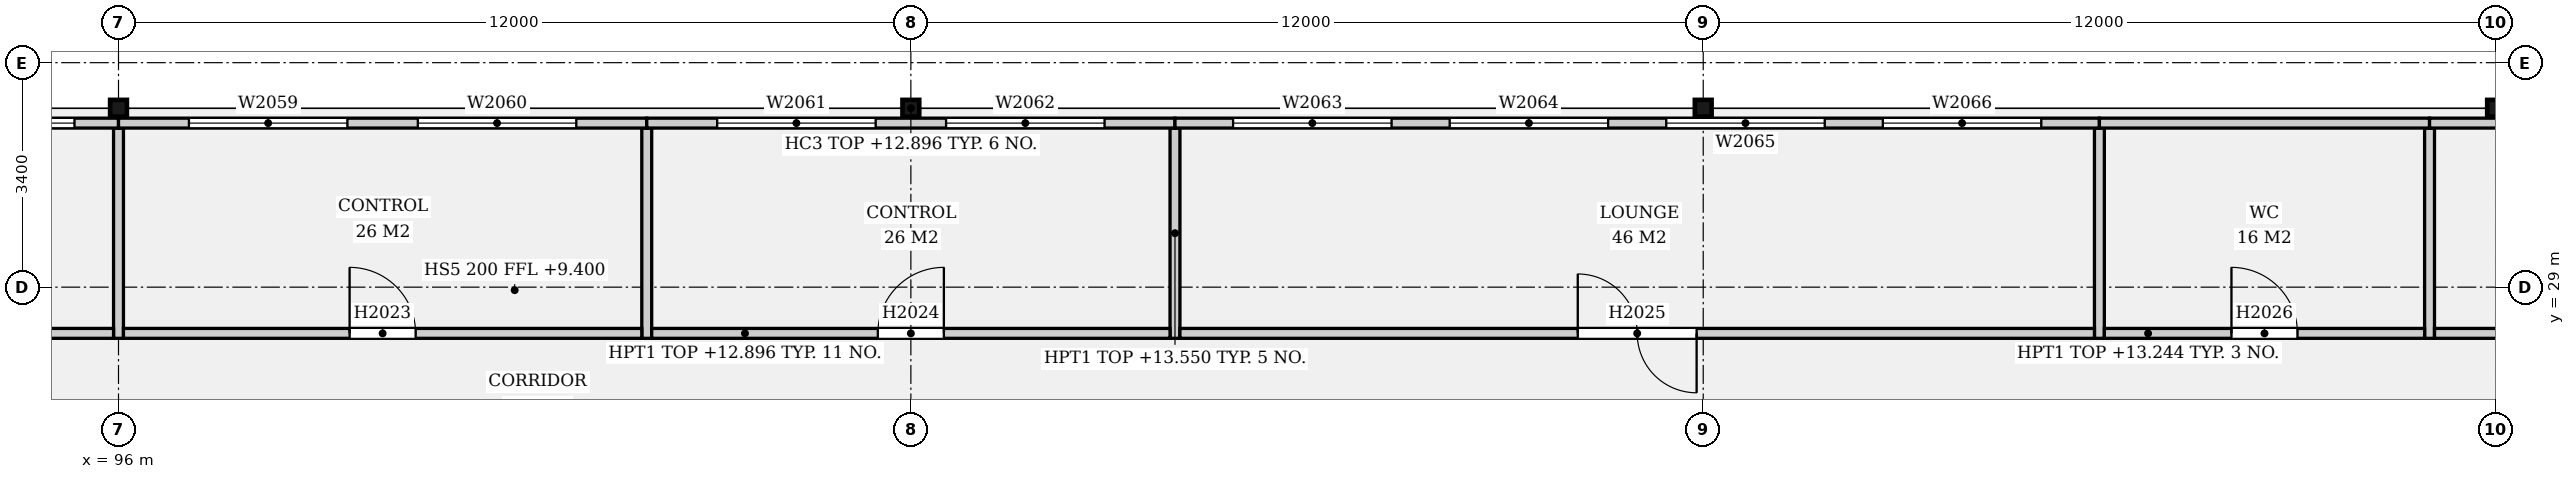
"""IFC4 building model, lengths in metres.
Left out: names, types, materials, properties, quantities, classifications, styles, units other than length and angle.
Written with IfcOpenShell. Run it as: python <this file> out.ifc"""

import sys

from ifc_helpers import new_model, si_unit, direction, frame, frame_2d, origin, origin_2d, place, context, subcontext, project, spatial, rectangle, hollow_rectangle, extrude, element, fill, save


model = new_model("IFC4")
c1 = context("Model", 3, precision=1e-05, world=origin(), true_north=direction((0.0, 1.0)))
c2 = subcontext(c1, "Body", "Model", "MODEL_VIEW")
j1 = project(units=[si_unit("LENGTHUNIT", "METRE"), si_unit("PLANEANGLEUNIT", "RADIAN")], contexts=[c1])
p1 = place(None, origin())
s1 = spatial("IfcSite", under=j1, at=p1, CompositionType="ELEMENT")
p2 = place(p1, origin())
s2 = spatial("IfcBuilding", under=s1, at=p2, CompositionType="ELEMENT")
p3 = place(p2, frame((0.0, 0.0, 9.4)))
s3 = spatial("IfcBuildingStorey", under=s2, at=p3, CompositionType="ELEMENT", Elevation=9.4)
for number, where, z_axis, x_axis in (
    (1, (96.0, 31.71, 0.0), (0.0, 0.0, 1.0), (1.0, 0.0, 0.0)),
    (2, (108.0, 31.71, 0.0), (0.0, 0.0, 1.0), (1.0, 0.0, 0.0)),
    (3, (120.0, 31.71, 0.0), (0.0, 0.0, 1.0), (1.0, 0.0, 0.0)),
    (4, (132.0, 31.71, 0.0), (0.0, 0.0, 1.0), (1.0, 0.0, 0.0)),
):
    element("IfcColumn", number, at=place(p3, frame(where, z_axis=z_axis, x_axis=x_axis)), inside=s3, PredefinedType="COLUMN", context=c2, shape_type="SweptSolid", body=[
        extrude(hollow_rectangle(XDim=0.254, YDim=0.254, WallThickness=0.016, InnerFilletRadius=0.008, OuterFilletRadius=0.024, at=origin_2d()), origin(), (0.0, 0.0, 1.0), 3.496),
    ])
p4 = place(p3, frame((80.075, 28.3, 0.0), z_axis=(0.0, 0.0, 1.0), x_axis=(1.0, 0.0, 0.0)))
e5 = element("IfcWall", 5, at=p4, inside=s3, PredefinedType="PARTITIONING", context=c2, shape_type="SweptSolid", body=[
    extrude(rectangle(XDim=15.85, YDim=0.15, at=frame_2d((7.925, 0.0))), origin(), (0.0, 0.0, 1.0), 3.496),
])
p5 = place(p4, frame((7.025, 0.0, 0.0)))
e6 = element("IfcOpeningElement", 6, at=p5, cuts=e5, PredefinedType="OPENING", context=c2, shape_type="SweptSolid", body=[
    extrude(rectangle(XDim=1.8, YDim=2.1, at=frame_2d((0.9, 1.05))), frame((0.0, 0.085, 0.0), z_axis=(0.0, -1.0, 0.0), x_axis=(1.0, 0.0, 0.0)), (0.0, 0.0, 1.0), 0.17),
])
p6 = place(p3, frame((96.0, 31.41, 0.0), z_axis=(0.0, 0.0, 1.0), x_axis=(0.0, -1.0, 0.0)))
e7 = element("IfcWall", 7, at=p6, inside=s3, PredefinedType="PARTITIONING", context=c2, shape_type="SweptSolid", body=[
    extrude(rectangle(XDim=3.185, YDim=0.15, at=frame_2d((1.592, 0.0))), origin(), (0.0, 0.0, 1.0), 3.496),
])
p7 = place(p3, frame((80.0, 31.485, 0.0), z_axis=(0.0, 0.0, 1.0), x_axis=(1.0, 0.0, 0.0)))
e8 = element("IfcWall", 8, at=p7, inside=s3, PredefinedType="PARTITIONING", context=c2, shape_type="SweptSolid", body=[
    extrude(rectangle(XDim=16.0, YDim=0.15, at=frame_2d((8.0, 0.0))), origin(), (0.0, 0.0, 1.0), 3.496),
])
p8 = place(p7, frame((0.667, 0.0, 1.0)))
e9 = element("IfcOpeningElement", 9, at=p8, cuts=e8, PredefinedType="OPENING", context=c2, shape_type="SweptSolid", body=[
    extrude(rectangle(XDim=2.4, YDim=1.5, at=frame_2d((1.2, 0.75))), frame((0.0, 0.085, 0.0), z_axis=(0.0, -1.0, 0.0), x_axis=(1.0, 0.0, 0.0)), (0.0, 0.0, 1.0), 0.17),
])
p9 = place(p7, frame((3.733, 0.0, 1.0)))
e10 = element("IfcOpeningElement", 10, at=p9, cuts=e8, PredefinedType="OPENING", context=c2, shape_type="SweptSolid", body=[
    extrude(rectangle(XDim=2.4, YDim=1.5, at=frame_2d((1.2, 0.75))), frame((0.0, 0.085, 0.0), z_axis=(0.0, -1.0, 0.0), x_axis=(1.0, 0.0, 0.0)), (0.0, 0.0, 1.0), 0.17),
])
p10 = place(p7, frame((6.8, 0.0, 1.0)))
e11 = element("IfcOpeningElement", 11, at=p10, cuts=e8, PredefinedType="OPENING", context=c2, shape_type="SweptSolid", body=[
    extrude(rectangle(XDim=2.4, YDim=1.5, at=frame_2d((1.2, 0.75))), frame((0.0, 0.085, 0.0), z_axis=(0.0, -1.0, 0.0), x_axis=(1.0, 0.0, 0.0)), (0.0, 0.0, 1.0), 0.17),
])
p11 = place(p7, frame((9.867, 0.0, 1.0)))
e12 = element("IfcOpeningElement", 12, at=p11, cuts=e8, PredefinedType="OPENING", context=c2, shape_type="SweptSolid", body=[
    extrude(rectangle(XDim=2.4, YDim=1.5, at=frame_2d((1.2, 0.75))), frame((0.0, 0.085, 0.0), z_axis=(0.0, -1.0, 0.0), x_axis=(1.0, 0.0, 0.0)), (0.0, 0.0, 1.0), 0.17),
])
p12 = place(p7, frame((12.933, 0.0, 1.0)))
e13 = element("IfcOpeningElement", 13, at=p12, cuts=e8, PredefinedType="OPENING", context=c2, shape_type="SweptSolid", body=[
    extrude(rectangle(XDim=2.4, YDim=1.5, at=frame_2d((1.2, 0.75))), frame((0.0, 0.085, 0.0), z_axis=(0.0, -1.0, 0.0), x_axis=(1.0, 0.0, 0.0)), (0.0, 0.0, 1.0), 0.17),
])
p13 = place(p3, frame((96.075, 28.3, 0.0), z_axis=(0.0, 0.0, 1.0), x_axis=(1.0, 0.0, 0.0)))
e14 = element("IfcWall", 14, at=p13, inside=s3, PredefinedType="PARTITIONING", context=c2, shape_type="SweptSolid", body=[
    extrude(rectangle(XDim=7.85, YDim=0.15, at=frame_2d((3.925, 0.0))), origin(), (0.0, 0.0, 1.0), 3.496),
])
p14 = place(p13, frame((3.425, 0.0, 0.0)))
e15 = element("IfcOpeningElement", 15, at=p14, cuts=e14, PredefinedType="OPENING", context=c2, shape_type="SweptSolid", body=[
    extrude(rectangle(XDim=1.0, YDim=2.1, at=frame_2d((0.5, 1.05))), frame((0.0, 0.085, 0.0), z_axis=(0.0, -1.0, 0.0), x_axis=(1.0, 0.0, 0.0)), (0.0, 0.0, 1.0), 0.17),
])
p15 = place(p3, frame((104.0, 31.41, 0.0), z_axis=(0.0, 0.0, 1.0), x_axis=(0.0, -1.0, 0.0)))
e16 = element("IfcWall", 16, at=p15, inside=s3, PredefinedType="PARTITIONING", context=c2, shape_type="SweptSolid", body=[
    extrude(rectangle(XDim=3.185, YDim=0.15, at=frame_2d((1.592, 0.0))), origin(), (0.0, 0.0, 1.0), 4.15),
])
p16 = place(p3, frame((96.0, 31.485, 0.0), z_axis=(0.0, 0.0, 1.0), x_axis=(1.0, 0.0, 0.0)))
e17 = element("IfcWall", 17, at=p16, inside=s3, PredefinedType="PARTITIONING", context=c2, shape_type="SweptSolid", body=[
    extrude(rectangle(XDim=8.0, YDim=0.15, at=frame_2d((4.0, 0.0))), origin(), (0.0, 0.0, 1.0), 3.496),
])
p17 = place(p16, frame((1.067, 0.0, 1.0)))
e18 = element("IfcOpeningElement", 18, at=p17, cuts=e17, PredefinedType="OPENING", context=c2, shape_type="SweptSolid", body=[
    extrude(rectangle(XDim=2.4, YDim=1.5, at=frame_2d((1.2, 0.75))), frame((0.0, 0.085, 0.0), z_axis=(0.0, -1.0, 0.0), x_axis=(1.0, 0.0, 0.0)), (0.0, 0.0, 1.0), 0.17),
])
p18 = place(p16, frame((4.533, 0.0, 1.0)))
e19 = element("IfcOpeningElement", 19, at=p18, cuts=e17, PredefinedType="OPENING", context=c2, shape_type="SweptSolid", body=[
    extrude(rectangle(XDim=2.4, YDim=1.5, at=frame_2d((1.2, 0.75))), frame((0.0, 0.085, 0.0), z_axis=(0.0, -1.0, 0.0), x_axis=(1.0, 0.0, 0.0)), (0.0, 0.0, 1.0), 0.17),
])
p19 = place(p3, frame((104.075, 28.3, 0.0), z_axis=(0.0, 0.0, 1.0), x_axis=(1.0, 0.0, 0.0)))
e20 = element("IfcWall", 20, at=p19, inside=s3, PredefinedType="PARTITIONING", context=c2, shape_type="SweptSolid", body=[
    extrude(rectangle(XDim=7.85, YDim=0.15, at=frame_2d((3.925, 0.0))), origin(), (0.0, 0.0, 1.0), 3.496),
])
p20 = place(p19, frame((3.425, 0.0, 0.0)))
e21 = element("IfcOpeningElement", 21, at=p20, cuts=e20, PredefinedType="OPENING", context=c2, shape_type="SweptSolid", body=[
    extrude(rectangle(XDim=1.0, YDim=2.1, at=frame_2d((0.5, 1.05))), frame((0.0, 0.085, 0.0), z_axis=(0.0, -1.0, 0.0), x_axis=(1.0, 0.0, 0.0)), (0.0, 0.0, 1.0), 0.17),
])
p21 = place(p3, frame((112.0, 31.41, 0.0), z_axis=(0.0, 0.0, 1.0), x_axis=(0.0, -1.0, 0.0)))
e22 = element("IfcWall", 22, at=p21, inside=s3, PredefinedType="PARTITIONING", context=c2, shape_type="SweptSolid", body=[
    extrude(rectangle(XDim=3.185, YDim=0.15, at=frame_2d((1.592, 0.0))), origin(), (0.0, 0.0, 1.0), 4.15),
])
p22 = place(p3, frame((104.0, 31.485, 0.0), z_axis=(0.0, 0.0, 1.0), x_axis=(1.0, 0.0, 0.0)))
e23 = element("IfcWall", 23, at=p22, inside=s3, PredefinedType="PARTITIONING", context=c2, shape_type="SweptSolid", body=[
    extrude(rectangle(XDim=8.0, YDim=0.15, at=frame_2d((4.0, 0.0))), origin(), (0.0, 0.0, 1.0), 3.496),
])
p23 = place(p22, frame((1.067, 0.0, 1.0)))
e24 = element("IfcOpeningElement", 24, at=p23, cuts=e23, PredefinedType="OPENING", context=c2, shape_type="SweptSolid", body=[
    extrude(rectangle(XDim=2.4, YDim=1.5, at=frame_2d((1.2, 0.75))), frame((0.0, 0.085, 0.0), z_axis=(0.0, -1.0, 0.0), x_axis=(1.0, 0.0, 0.0)), (0.0, 0.0, 1.0), 0.17),
])
p24 = place(p22, frame((4.533, 0.0, 1.0)))
e25 = element("IfcOpeningElement", 25, at=p24, cuts=e23, PredefinedType="OPENING", context=c2, shape_type="SweptSolid", body=[
    extrude(rectangle(XDim=2.4, YDim=1.5, at=frame_2d((1.2, 0.75))), frame((0.0, 0.085, 0.0), z_axis=(0.0, -1.0, 0.0), x_axis=(1.0, 0.0, 0.0)), (0.0, 0.0, 1.0), 0.17),
])
p25 = place(p3, frame((112.075, 28.3, 0.0), z_axis=(0.0, 0.0, 1.0), x_axis=(1.0, 0.0, 0.0)))
e26 = element("IfcWall", 26, at=p25, inside=s3, PredefinedType="PARTITIONING", context=c2, shape_type="SweptSolid", body=[
    extrude(rectangle(XDim=13.85, YDim=0.15, at=frame_2d((6.925, 0.0))), origin(), (0.0, 0.0, 1.0), 3.496),
])
p26 = place(p25, frame((6.025, 0.0, 0.0)))
e27 = element("IfcOpeningElement", 27, at=p26, cuts=e26, PredefinedType="OPENING", context=c2, shape_type="SweptSolid", body=[
    extrude(rectangle(XDim=1.8, YDim=2.1, at=frame_2d((0.9, 1.05))), frame((0.0, 0.085, 0.0), z_axis=(0.0, -1.0, 0.0), x_axis=(1.0, 0.0, 0.0)), (0.0, 0.0, 1.0), 0.17),
])
p27 = place(p3, frame((126.0, 31.41, 0.0), z_axis=(0.0, 0.0, 1.0), x_axis=(0.0, -1.0, 0.0)))
e28 = element("IfcWall", 28, at=p27, inside=s3, PredefinedType="PARTITIONING", context=c2, shape_type="SweptSolid", body=[
    extrude(rectangle(XDim=3.185, YDim=0.15, at=frame_2d((1.592, 0.0))), origin(), (0.0, 0.0, 1.0), 3.844),
])
p28 = place(p3, frame((112.0, 31.485, 0.0), z_axis=(0.0, 0.0, 1.0), x_axis=(1.0, 0.0, 0.0)))
e29 = element("IfcWall", 29, at=p28, inside=s3, PredefinedType="PARTITIONING", context=c2, shape_type="SweptSolid", body=[
    extrude(rectangle(XDim=14.0, YDim=0.15, at=frame_2d((7.0, 0.0))), origin(), (0.0, 0.0, 1.0), 3.496),
])
p29 = place(p28, frame((0.88, 0.0, 1.0)))
e30 = element("IfcOpeningElement", 30, at=p29, cuts=e29, PredefinedType="OPENING", context=c2, shape_type="SweptSolid", body=[
    extrude(rectangle(XDim=2.4, YDim=1.5, at=frame_2d((1.2, 0.75))), frame((0.0, 0.085, 0.0), z_axis=(0.0, -1.0, 0.0), x_axis=(1.0, 0.0, 0.0)), (0.0, 0.0, 1.0), 0.17),
])
p30 = place(p28, frame((4.16, 0.0, 1.0)))
e31 = element("IfcOpeningElement", 31, at=p30, cuts=e29, PredefinedType="OPENING", context=c2, shape_type="SweptSolid", body=[
    extrude(rectangle(XDim=2.4, YDim=1.5, at=frame_2d((1.2, 0.75))), frame((0.0, 0.085, 0.0), z_axis=(0.0, -1.0, 0.0), x_axis=(1.0, 0.0, 0.0)), (0.0, 0.0, 1.0), 0.17),
])
p31 = place(p28, frame((7.44, 0.0, 1.0)))
e32 = element("IfcOpeningElement", 32, at=p31, cuts=e29, PredefinedType="OPENING", context=c2, shape_type="SweptSolid", body=[
    extrude(rectangle(XDim=2.4, YDim=1.5, at=frame_2d((1.2, 0.75))), frame((0.0, 0.085, 0.0), z_axis=(0.0, -1.0, 0.0), x_axis=(1.0, 0.0, 0.0)), (0.0, 0.0, 1.0), 0.17),
])
p32 = place(p28, frame((10.72, 0.0, 1.0)))
e33 = element("IfcOpeningElement", 33, at=p32, cuts=e29, PredefinedType="OPENING", context=c2, shape_type="SweptSolid", body=[
    extrude(rectangle(XDim=2.4, YDim=1.5, at=frame_2d((1.2, 0.75))), frame((0.0, 0.085, 0.0), z_axis=(0.0, -1.0, 0.0), x_axis=(1.0, 0.0, 0.0)), (0.0, 0.0, 1.0), 0.17),
])
p33 = place(p3, frame((126.075, 28.3, 0.0), z_axis=(0.0, 0.0, 1.0), x_axis=(1.0, 0.0, 0.0)))
e34 = element("IfcWall", 34, at=p33, inside=s3, PredefinedType="PARTITIONING", context=c2, shape_type="SweptSolid", body=[
    extrude(rectangle(XDim=4.85, YDim=0.15, at=frame_2d((2.425, 0.0))), origin(), (0.0, 0.0, 1.0), 3.844),
])
p34 = place(p33, frame((1.925, 0.0, 0.0)))
e35 = element("IfcOpeningElement", 35, at=p34, cuts=e34, PredefinedType="OPENING", context=c2, shape_type="SweptSolid", body=[
    extrude(rectangle(XDim=1.0, YDim=2.1, at=frame_2d((0.5, 1.05))), frame((0.0, 0.085, 0.0), z_axis=(0.0, -1.0, 0.0), x_axis=(1.0, 0.0, 0.0)), (0.0, 0.0, 1.0), 0.17),
])
p35 = place(p3, frame((131.0, 31.41, 0.0), z_axis=(0.0, 0.0, 1.0), x_axis=(0.0, -1.0, 0.0)))
e36 = element("IfcWall", 36, at=p35, inside=s3, PredefinedType="PARTITIONING", context=c2, shape_type="SweptSolid", body=[
    extrude(rectangle(XDim=3.185, YDim=0.15, at=frame_2d((1.592, 0.0))), origin(), (0.0, 0.0, 1.0), 4.15),
])
p36 = place(p3, frame((126.0, 31.485, 0.0), z_axis=(0.0, 0.0, 1.0), x_axis=(1.0, 0.0, 0.0)))
e37 = element("IfcWall", 37, at=p36, inside=s3, PredefinedType="PARTITIONING", context=c2, shape_type="SweptSolid", body=[
    extrude(rectangle(XDim=5.0, YDim=0.15, at=frame_2d((2.5, 0.0))), origin(), (0.0, 0.0, 1.0), 3.844),
])
p37 = place(p3, frame((131.075, 28.3, 0.0), z_axis=(0.0, 0.0, 1.0), x_axis=(1.0, 0.0, 0.0)))
e38 = element("IfcWall", 38, at=p37, inside=s3, PredefinedType="PARTITIONING", context=c2, shape_type="SweptSolid", body=[
    extrude(rectangle(XDim=4.85, YDim=0.15, at=frame_2d((2.425, 0.0))), origin(), (0.0, 0.0, 1.0), 3.496),
])
p38 = place(p37, frame((1.925, 0.0, 0.0)))
e39 = element("IfcOpeningElement", 39, at=p38, cuts=e38, PredefinedType="OPENING", context=c2, shape_type="SweptSolid", body=[
    extrude(rectangle(XDim=1.0, YDim=2.1, at=frame_2d((0.5, 1.05))), frame((0.0, 0.085, 0.0), z_axis=(0.0, -1.0, 0.0), x_axis=(1.0, 0.0, 0.0)), (0.0, 0.0, 1.0), 0.17),
])
p39 = place(p3, frame((131.0, 31.485, 0.0), z_axis=(0.0, 0.0, 1.0), x_axis=(1.0, 0.0, 0.0)))
e40 = element("IfcWall", 40, at=p39, inside=s3, PredefinedType="PARTITIONING", context=c2, shape_type="SweptSolid", body=[
    extrude(rectangle(XDim=5.0, YDim=0.15, at=frame_2d((2.5, 0.0))), origin(), (0.0, 0.0, 1.0), 3.496),
])
p40 = place(p12, origin())
e41 = element("IfcWindow", 41, at=p40, inside=s3, PartitioningType="SINGLE_PANEL", PredefinedType="WINDOW", context=c2, shape_type="SweptSolid", body=[
    extrude(rectangle(XDim=2.4, YDim=1.5, at=frame_2d((1.2, 0.75))), frame((0.0, 0.03, 0.0), z_axis=(0.0, -1.0, 0.0), x_axis=(1.0, 0.0, 0.0)), (0.0, 0.0, 1.0), 0.06),
])
fill(e13, e41)
p41 = place(p14, origin())
e42 = element("IfcDoor", 42, at=p41, inside=s3, OperationType="SINGLE_SWING_LEFT", PredefinedType="DOOR", context=c2, shape_type="SweptSolid", body=[
    extrude(rectangle(XDim=1.0, YDim=2.1, at=frame_2d((0.5, 1.05))), frame((0.0, 0.025, 0.0), z_axis=(0.0, -1.0, 0.0), x_axis=(1.0, 0.0, 0.0)), (0.0, 0.0, 1.0), 0.05),
])
fill(e15, e42)
p42 = place(p17, origin())
e43 = element("IfcWindow", 43, at=p42, inside=s3, PartitioningType="SINGLE_PANEL", PredefinedType="WINDOW", context=c2, shape_type="SweptSolid", body=[
    extrude(rectangle(XDim=2.4, YDim=1.5, at=frame_2d((1.2, 0.75))), frame((0.0, 0.03, 0.0), z_axis=(0.0, -1.0, 0.0), x_axis=(1.0, 0.0, 0.0)), (0.0, 0.0, 1.0), 0.06),
])
fill(e18, e43)
p43 = place(p18, origin())
e44 = element("IfcWindow", 44, at=p43, inside=s3, PartitioningType="SINGLE_PANEL", PredefinedType="WINDOW", context=c2, shape_type="SweptSolid", body=[
    extrude(rectangle(XDim=2.4, YDim=1.5, at=frame_2d((1.2, 0.75))), frame((0.0, 0.03, 0.0), z_axis=(0.0, -1.0, 0.0), x_axis=(1.0, 0.0, 0.0)), (0.0, 0.0, 1.0), 0.06),
])
fill(e19, e44)
p44 = place(p20, origin())
e45 = element("IfcDoor", 45, at=p44, inside=s3, OperationType="SINGLE_SWING_RIGHT", PredefinedType="DOOR", context=c2, shape_type="SweptSolid", body=[
    extrude(rectangle(XDim=1.0, YDim=2.1, at=frame_2d((0.5, 1.05))), frame((0.0, 0.025, 0.0), z_axis=(0.0, -1.0, 0.0), x_axis=(1.0, 0.0, 0.0)), (0.0, 0.0, 1.0), 0.05),
])
fill(e21, e45)
p45 = place(p23, origin())
e46 = element("IfcWindow", 46, at=p45, inside=s3, PartitioningType="SINGLE_PANEL", PredefinedType="WINDOW", context=c2, shape_type="SweptSolid", body=[
    extrude(rectangle(XDim=2.4, YDim=1.5, at=frame_2d((1.2, 0.75))), frame((0.0, 0.03, 0.0), z_axis=(0.0, -1.0, 0.0), x_axis=(1.0, 0.0, 0.0)), (0.0, 0.0, 1.0), 0.06),
])
fill(e24, e46)
p46 = place(p24, origin())
e47 = element("IfcWindow", 47, at=p46, inside=s3, PartitioningType="SINGLE_PANEL", PredefinedType="WINDOW", context=c2, shape_type="SweptSolid", body=[
    extrude(rectangle(XDim=2.4, YDim=1.5, at=frame_2d((1.2, 0.75))), frame((0.0, 0.03, 0.0), z_axis=(0.0, -1.0, 0.0), x_axis=(1.0, 0.0, 0.0)), (0.0, 0.0, 1.0), 0.06),
])
fill(e25, e47)
p47 = place(p26, origin())
e48 = element("IfcDoor", 48, at=p47, inside=s3, OperationType="DOUBLE_DOOR_SINGLE_SWING", PredefinedType="DOOR", context=c2, shape_type="SweptSolid", body=[
    extrude(rectangle(XDim=1.8, YDim=2.1, at=frame_2d((0.9, 1.05))), frame((0.0, 0.025, 0.0), z_axis=(0.0, -1.0, 0.0), x_axis=(1.0, 0.0, 0.0)), (0.0, 0.0, 1.0), 0.05),
])
fill(e27, e48)
p48 = place(p29, origin())
e49 = element("IfcWindow", 49, at=p48, inside=s3, PartitioningType="SINGLE_PANEL", PredefinedType="WINDOW", context=c2, shape_type="SweptSolid", body=[
    extrude(rectangle(XDim=2.4, YDim=1.5, at=frame_2d((1.2, 0.75))), frame((0.0, 0.03, 0.0), z_axis=(0.0, -1.0, 0.0), x_axis=(1.0, 0.0, 0.0)), (0.0, 0.0, 1.0), 0.06),
])
fill(e30, e49)
p49 = place(p30, origin())
e50 = element("IfcWindow", 50, at=p49, inside=s3, PartitioningType="SINGLE_PANEL", PredefinedType="WINDOW", context=c2, shape_type="SweptSolid", body=[
    extrude(rectangle(XDim=2.4, YDim=1.5, at=frame_2d((1.2, 0.75))), frame((0.0, 0.03, 0.0), z_axis=(0.0, -1.0, 0.0), x_axis=(1.0, 0.0, 0.0)), (0.0, 0.0, 1.0), 0.06),
])
fill(e31, e50)
p50 = place(p31, origin())
e51 = element("IfcWindow", 51, at=p50, inside=s3, PartitioningType="SINGLE_PANEL", PredefinedType="WINDOW", context=c2, shape_type="SweptSolid", body=[
    extrude(rectangle(XDim=2.4, YDim=1.5, at=frame_2d((1.2, 0.75))), frame((0.0, 0.03, 0.0), z_axis=(0.0, -1.0, 0.0), x_axis=(1.0, 0.0, 0.0)), (0.0, 0.0, 1.0), 0.06),
])
fill(e32, e51)
p51 = place(p32, origin())
e52 = element("IfcWindow", 52, at=p51, inside=s3, PartitioningType="SINGLE_PANEL", PredefinedType="WINDOW", context=c2, shape_type="SweptSolid", body=[
    extrude(rectangle(XDim=2.4, YDim=1.5, at=frame_2d((1.2, 0.75))), frame((0.0, 0.03, 0.0), z_axis=(0.0, -1.0, 0.0), x_axis=(1.0, 0.0, 0.0)), (0.0, 0.0, 1.0), 0.06),
])
fill(e33, e52)
p52 = place(p34, origin())
e53 = element("IfcDoor", 53, at=p52, inside=s3, OperationType="SINGLE_SWING_LEFT", PredefinedType="DOOR", context=c2, shape_type="SweptSolid", body=[
    extrude(rectangle(XDim=1.0, YDim=2.1, at=frame_2d((0.5, 1.05))), frame((0.0, 0.025, 0.0), z_axis=(0.0, -1.0, 0.0), x_axis=(1.0, 0.0, 0.0)), (0.0, 0.0, 1.0), 0.05),
])
fill(e35, e53)
save(model, sys.argv[1])
